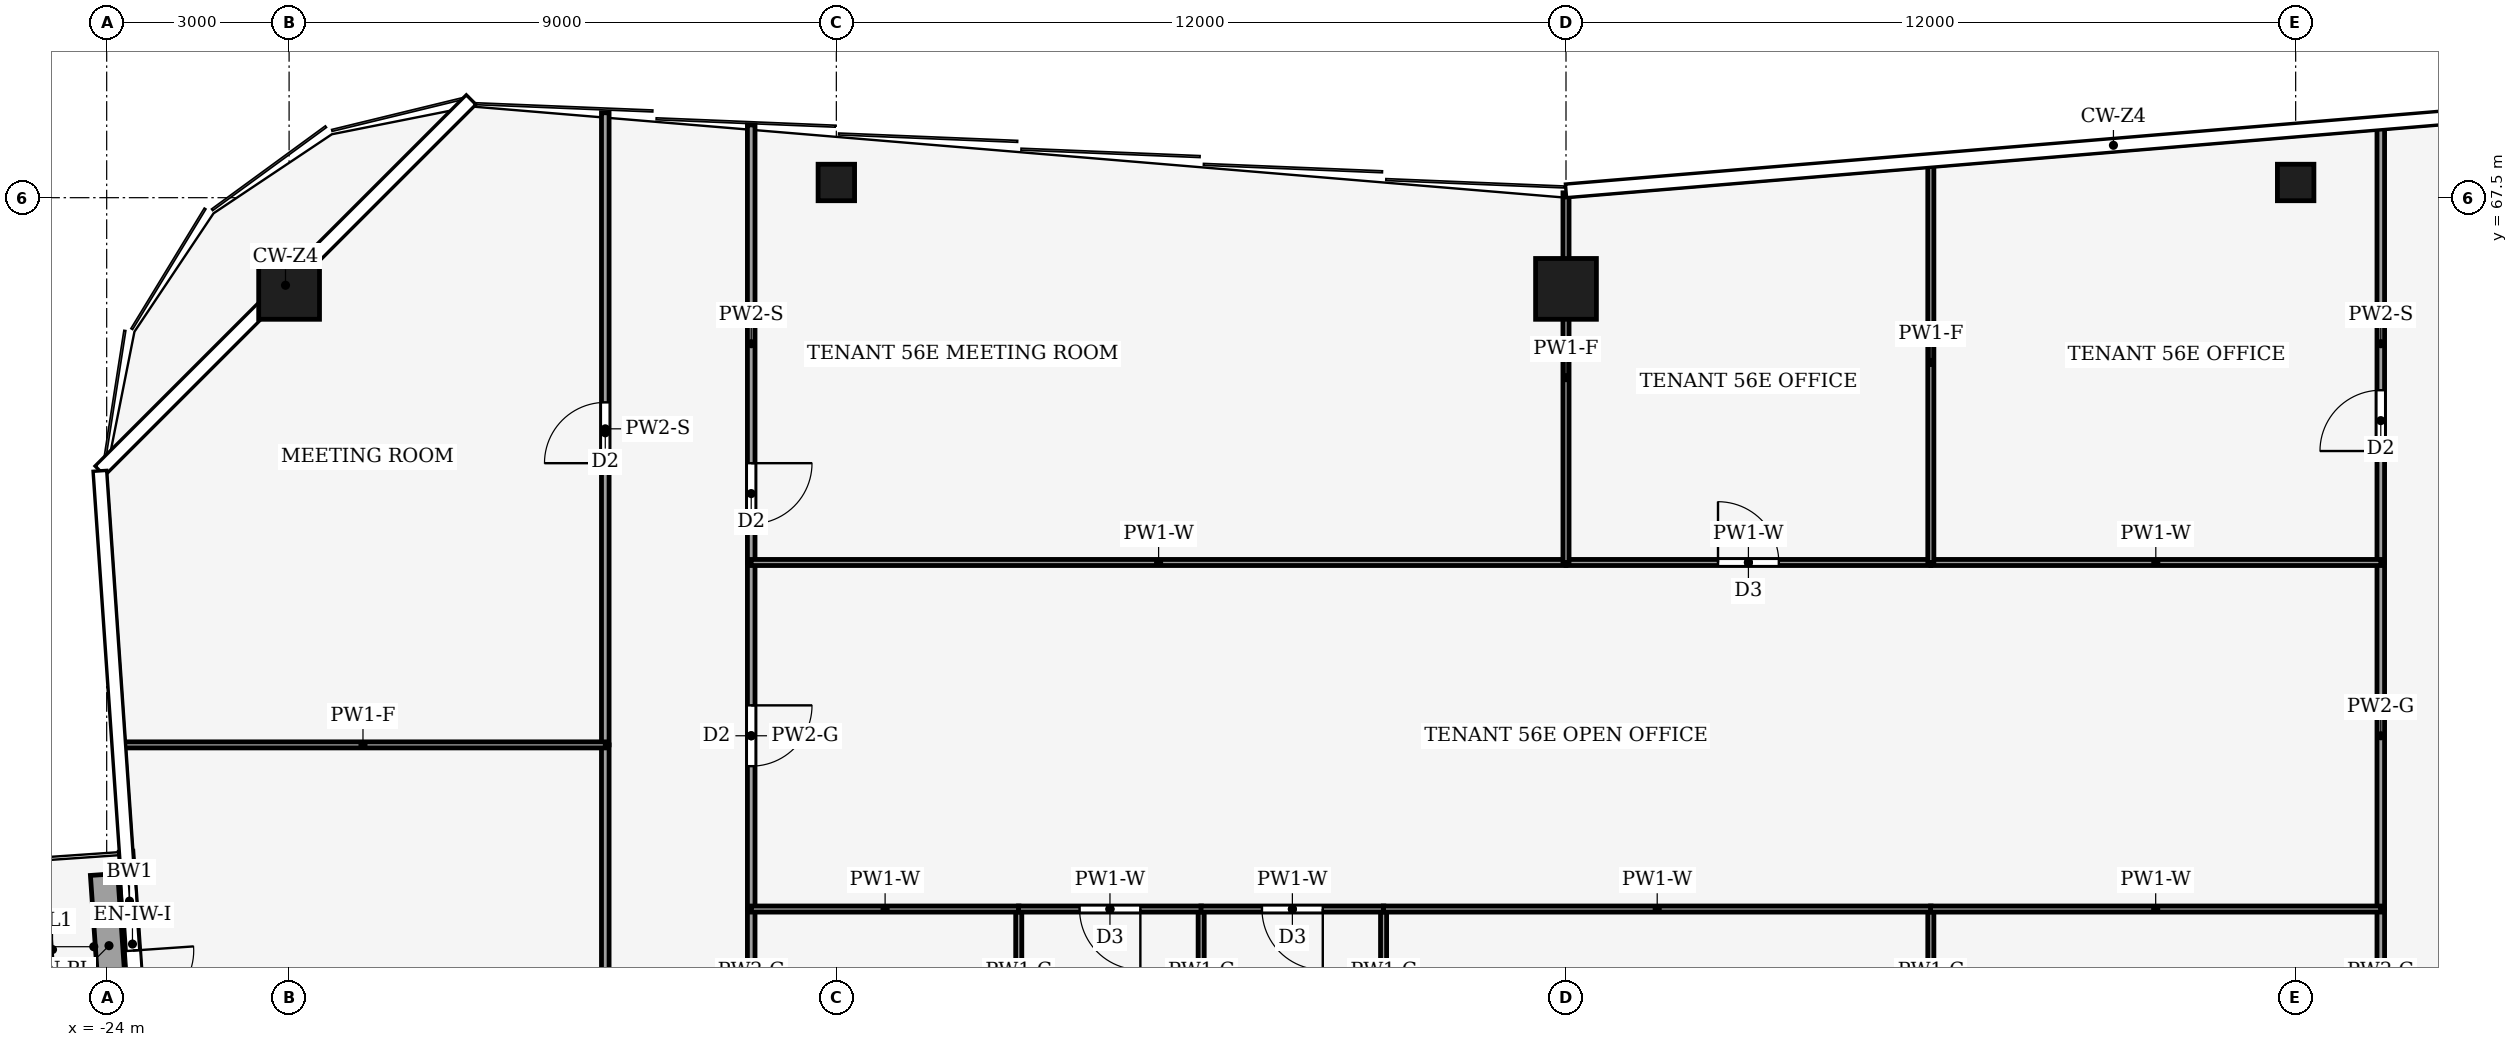
"""IFC4 building model, lengths in metres.
Left out: names, types, materials, properties, quantities, classifications, styles, units other than length and angle.
Written with IfcOpenShell. Run it as: python <this file> out.ifc"""

import sys

from ifc_helpers import new_model, si_unit, direction, frame, frame_2d, origin, origin_2d, place, context, subcontext, project, spatial, rectangle, hollow_rectangle, extrude, element, fill, save


model = new_model("IFC4")
c1 = context("Model", 3, precision=1e-05, world=origin(), true_north=direction((0.0, 1.0)))
c2 = subcontext(c1, "Body", "Model", "MODEL_VIEW")
j1 = project(units=[si_unit("LENGTHUNIT", "METRE"), si_unit("PLANEANGLEUNIT", "RADIAN")], contexts=[c1])
p1 = place(None, origin())
s1 = spatial("IfcSite", under=j1, at=p1, CompositionType="ELEMENT")
p2 = place(p1, origin())
s2 = spatial("IfcBuilding", under=s1, at=p2, CompositionType="ELEMENT")
p3 = place(p2, frame((0.0, 0.0, 246.0)))
s3 = spatial("IfcBuildingStorey", under=s2, at=p3, CompositionType="ELEMENT", Elevation=246.0)
for number, where, z_axis, x_axis in (
    (1, (-21.0, 66.0, 0.0), (0.0, 0.0, 1.0), (1.0, 0.0, 0.0)),
    (2, (0.0, 66.0, 0.0), (0.0, 0.0, 1.0), (1.0, 0.0, 0.0)),
):
    element("IfcColumn", number, at=place(p3, frame(where, z_axis=z_axis, x_axis=x_axis)), inside=s3, PredefinedType="COLUMN", context=c2, shape_type="SweptSolid", body=[
        extrude(hollow_rectangle(XDim=1.0, YDim=1.0, WallThickness=0.045, at=origin_2d()), origin(), (0.0, 0.0, 1.0), 4.0),
    ])
for number, where, z_axis, x_axis in (
    (3, (-12.0, 67.75, 0.0), (0.0, 0.0, 1.0), (1.0, 0.0, 0.0)),
    (4, (12.0, 67.75, 0.0), (0.0, 0.0, 1.0), (1.0, 0.0, 0.0)),
):
    element("IfcColumn", number, at=place(p3, frame(where, z_axis=z_axis, x_axis=x_axis)), inside=s3, PredefinedType="COLUMN", context=c2, shape_type="SweptSolid", body=[
        extrude(hollow_rectangle(XDim=0.6, YDim=0.6, WallThickness=0.025, at=origin_2d()), origin(), (0.0, 0.0, 1.0), 4.0),
    ])
p4 = place(p3, frame((-23.681, 56.744, 0.0), z_axis=(0.0, 0.0, 1.0), x_axis=(0.068837845086, -0.997627862023, 0.0)))
e5 = element("IfcWall", 5, at=p4, inside=s3, PredefinedType="SOLIDWALL", context=c2, shape_type="SweptSolid", body=[
    extrude(rectangle(XDim=3.047, YDim=0.224, at=frame_2d((1.523, 0.0))), origin(), (0.0, 0.0, 1.0), 3.65),
])
p5 = place(p4, frame((1.631, 0.0, 0.0)))
e6 = element("IfcOpeningElement", 6, at=p5, cuts=e5, PredefinedType="OPENING", context=c2, shape_type="SweptSolid", body=[
    extrude(rectangle(XDim=1.0, YDim=2.1, at=frame_2d((0.5, 1.05))), frame((0.0, 0.122, 0.0), z_axis=(0.0, -1.0, 0.0), x_axis=(1.0, 0.0, 0.0)), (0.0, 0.0, 1.0), 0.244),
])
p6 = place(p4, frame((0.416, 0.0, 0.9)))
e7 = element("IfcOpeningElement", 7, at=p6, cuts=e5, PredefinedType="OPENING", context=c2, shape_type="SweptSolid", body=[
    extrude(rectangle(XDim=0.8, YDim=1.2, at=frame_2d((0.4, 0.6))), frame((0.0, 0.122, 0.0), z_axis=(0.0, -1.0, 0.0), x_axis=(1.0, 0.0, 0.0)), (0.0, 0.0, 1.0), 0.244),
])
p7 = place(p3, frame((-24.043, 56.368, 0.0), z_axis=(0.0, 0.0, 1.0), x_axis=(0.068769956374, -0.997632544127, 0.0)))
e8 = element("IfcWall", 8, at=p7, inside=s3, PredefinedType="USERDEFINED", context=c2, shape_type="SweptSolid", body=[
    extrude(rectangle(XDim=2.347, YDim=0.45, at=frame_2d((1.173, 0.0))), origin(), (0.0, 0.0, 1.0), 0.4),
])
p8 = place(p3, frame((-15.8, 46.5, 0.0), z_axis=(0.0, 0.0, 1.0), x_axis=(0.0, 1.0, 0.0)))
e9 = element("IfcWall", 9, at=p8, inside=s3, PredefinedType="PARTITIONING", context=c2, shape_type="SweptSolid", body=[
    extrude(rectangle(XDim=12.0, YDim=0.125, at=frame_2d((6.0, 0.0))), origin(), (0.0, 0.0, 1.0), 3.24),
])
p9 = place(p8, frame((5.5, 0.0, 0.0)))
e10 = element("IfcOpeningElement", 10, at=p9, cuts=e9, PredefinedType="OPENING", context=c2, shape_type="SweptSolid", body=[
    extrude(rectangle(XDim=1.0, YDim=2.1, at=frame_2d((0.5, 1.05))), frame((0.0, 0.073, 0.0), z_axis=(0.0, -1.0, 0.0), x_axis=(1.0, 0.0, 0.0)), (0.0, 0.0, 1.0), 0.145),
])
p10 = place(p3, frame((-15.8, 58.5, 0.0), z_axis=(0.0, 0.0, 1.0), x_axis=(0.0, 1.0, 0.0)))
e11 = element("IfcWall", 11, at=p10, inside=s3, PredefinedType="PARTITIONING", context=c2, shape_type="SweptSolid", body=[
    extrude(rectangle(XDim=10.397, YDim=0.125, at=frame_2d((5.198, 0.0))), origin(), (0.0, 0.0, 1.0), 3.04),
])
p11 = place(p10, frame((4.633, 0.0, 0.0)))
e12 = element("IfcOpeningElement", 12, at=p11, cuts=e11, PredefinedType="OPENING", context=c2, shape_type="SweptSolid", body=[
    extrude(rectangle(XDim=1.0, YDim=2.1, at=frame_2d((0.5, 1.05))), frame((0.0, 0.073, 0.0), z_axis=(0.0, -1.0, 0.0), x_axis=(1.0, 0.0, 0.0)), (0.0, 0.0, 1.0), 0.145),
])
for number, where, z_axis, x_axis in (
    (13, (-13.4, 52.8, 0.0), (0.0, 0.0, 1.0), (0.0, 1.0, 0.0)),
    (14, (13.4, 52.8, 0.0), (0.0, 0.0, 1.0), (0.0, 1.0, 0.0)),
):
    element("IfcWall", number, at=place(p3, frame(where, z_axis=z_axis, x_axis=x_axis)), inside=s3, PredefinedType="PARTITIONING", context=c2, shape_type="SweptSolid", body=[
        extrude(rectangle(XDim=3.0, YDim=0.125, at=frame_2d((1.5, 0.0))), origin(), (0.0, 0.0, 1.0), 3.87),
    ])
p12 = place(p3, frame((-13.4, 61.5, 0.0), z_axis=(0.0, 0.0, 1.0), x_axis=(0.0, -1.0, 0.0)))
e15 = element("IfcWall", 15, at=p12, inside=s3, PredefinedType="PARTITIONING", context=c2, shape_type="SweptSolid", body=[
    extrude(rectangle(XDim=5.7, YDim=0.125, at=frame_2d((2.85, 0.0))), origin(), (0.0, 0.0, 1.0), 3.87),
])
p13 = place(p12, frame((2.35, 0.0, 0.0)))
e16 = element("IfcOpeningElement", 16, at=p13, cuts=e15, PredefinedType="OPENING", context=c2, shape_type="SweptSolid", body=[
    extrude(rectangle(XDim=1.0, YDim=2.1, at=frame_2d((0.5, 1.05))), frame((0.0, 0.073, 0.0), z_axis=(0.0, -1.0, 0.0), x_axis=(1.0, 0.0, 0.0)), (0.0, 0.0, 1.0), 0.145),
])
p14 = place(p3, frame((13.4, 55.8, 0.0), z_axis=(0.0, 0.0, 1.0), x_axis=(0.0, 1.0, 0.0)))
e17 = element("IfcWall", 17, at=p14, inside=s3, PredefinedType="PARTITIONING", context=c2, shape_type="SweptSolid", body=[
    extrude(rectangle(XDim=5.7, YDim=0.125, at=frame_2d((2.85, 0.0))), origin(), (0.0, 0.0, 1.0), 3.87),
])
p15 = place(p3, frame((-13.4, 68.697, 0.0), z_axis=(0.0, 0.0, 1.0), x_axis=(0.0, -1.0, 0.0)))
e18 = element("IfcWall", 18, at=p15, inside=s3, PredefinedType="PARTITIONING", context=c2, shape_type="SweptSolid", body=[
    extrude(rectangle(XDim=7.197, YDim=0.125, at=frame_2d((3.598, 0.0))), origin(), (0.0, 0.0, 1.0), 3.04),
])
p16 = place(p15, frame((5.563, 0.0, 0.0)))
e19 = element("IfcOpeningElement", 19, at=p16, cuts=e18, PredefinedType="OPENING", context=c2, shape_type="SweptSolid", body=[
    extrude(rectangle(XDim=1.0, YDim=2.1, at=frame_2d((0.5, 1.05))), frame((0.0, 0.073, 0.0), z_axis=(0.0, -1.0, 0.0), x_axis=(1.0, 0.0, 0.0)), (0.0, 0.0, 1.0), 0.145),
])
p17 = place(p3, frame((13.4, 61.5, 0.0), z_axis=(0.0, 0.0, 1.0), x_axis=(0.0, 1.0, 0.0)))
e20 = element("IfcWall", 20, at=p17, inside=s3, PredefinedType="PARTITIONING", context=c2, shape_type="SweptSolid", body=[
    extrude(rectangle(XDim=7.197, YDim=0.125, at=frame_2d((3.598, 0.0))), origin(), (0.0, 0.0, 1.0), 3.04),
])
p18 = place(p17, frame((1.833, 0.0, 0.0)))
e21 = element("IfcOpeningElement", 21, at=p18, cuts=e20, PredefinedType="OPENING", context=c2, shape_type="SweptSolid", body=[
    extrude(rectangle(XDim=1.0, YDim=2.1, at=frame_2d((0.5, 1.05))), frame((0.0, 0.073, 0.0), z_axis=(0.0, -1.0, 0.0), x_axis=(1.0, 0.0, 0.0)), (0.0, 0.0, 1.0), 0.145),
])
p19 = place(p3, frame((-15.8, 58.5, 0.0), z_axis=(0.0, 0.0, 1.0), x_axis=(-1.0, 0.0, 0.0)))
e22 = element("IfcWall", 22, at=p19, inside=s3, PredefinedType="PARTITIONING", context=c2, shape_type="SweptSolid", body=[
    extrude(rectangle(XDim=7.97, YDim=0.1, at=frame_2d((3.985, 0.0))), origin(), (0.0, 0.0, 1.0), 3.04),
])
p20 = place(p3, frame((-9.0, 52.8, 0.0), z_axis=(0.0, 0.0, 1.0), x_axis=(0.0, 1.0, 0.0)))
e23 = element("IfcWall", 23, at=p20, inside=s3, PredefinedType="PARTITIONING", context=c2, shape_type="SweptSolid", body=[
    extrude(rectangle(XDim=3.0, YDim=0.1, at=frame_2d((1.5, 0.0))), origin(), (0.0, 0.0, 1.0), 3.87),
])
p21 = place(p3, frame((-8.996, 55.8, 0.0), z_axis=(0.0, 0.0, 1.0), x_axis=(-1.0, 0.0, 0.0)))
e24 = element("IfcWall", 24, at=p21, inside=s3, PredefinedType="PARTITIONING", context=c2, shape_type="SweptSolid", body=[
    extrude(rectangle(XDim=4.404, YDim=0.1, at=frame_2d((2.202, 0.0))), origin(), (0.0, 0.0, 1.0), 3.24),
])
p22 = place(p3, frame((-6.0, 52.8, 0.0), z_axis=(0.0, 0.0, 1.0), x_axis=(0.0, 1.0, 0.0)))
e25 = element("IfcWall", 25, at=p22, inside=s3, PredefinedType="PARTITIONING", context=c2, shape_type="SweptSolid", body=[
    extrude(rectangle(XDim=3.0, YDim=0.1, at=frame_2d((1.5, 0.0))), origin(), (0.0, 0.0, 1.0), 3.87),
])
p23 = place(p3, frame((-5.996, 55.8, 0.0), z_axis=(0.0, 0.0, 1.0), x_axis=(-1.0, 0.0, 0.0)))
e26 = element("IfcWall", 26, at=p23, inside=s3, PredefinedType="PARTITIONING", context=c2, shape_type="SweptSolid", body=[
    extrude(rectangle(XDim=3.008, YDim=0.1, at=frame_2d((1.504, 0.0))), origin(), (0.0, 0.0, 1.0), 3.24),
])
p24 = place(p23, frame((1.004, 0.0, 0.0)))
e27 = element("IfcOpeningElement", 27, at=p24, cuts=e26, PredefinedType="OPENING", context=c2, shape_type="SweptSolid", body=[
    extrude(rectangle(XDim=1.0, YDim=2.1, at=frame_2d((0.5, 1.05))), frame((0.0, 0.06, 0.0), z_axis=(0.0, -1.0, 0.0), x_axis=(1.0, 0.0, 0.0)), (0.0, 0.0, 1.0), 0.12),
])
p25 = place(p3, frame((-3.0, 52.8, 0.0), z_axis=(0.0, 0.0, 1.0), x_axis=(0.0, 1.0, 0.0)))
e28 = element("IfcWall", 28, at=p25, inside=s3, PredefinedType="PARTITIONING", context=c2, shape_type="SweptSolid", body=[
    extrude(rectangle(XDim=3.0, YDim=0.1, at=frame_2d((1.5, 0.0))), origin(), (0.0, 0.0, 1.0), 3.87),
])
p26 = place(p3, frame((-2.996, 55.8, 0.0), z_axis=(0.0, 0.0, 1.0), x_axis=(-1.0, 0.0, 0.0)))
e29 = element("IfcWall", 29, at=p26, inside=s3, PredefinedType="PARTITIONING", context=c2, shape_type="SweptSolid", body=[
    extrude(rectangle(XDim=3.008, YDim=0.1, at=frame_2d((1.504, 0.0))), origin(), (0.0, 0.0, 1.0), 3.24),
])
p27 = place(p26, frame((1.004, 0.0, 0.0)))
e30 = element("IfcOpeningElement", 30, at=p27, cuts=e29, PredefinedType="OPENING", context=c2, shape_type="SweptSolid", body=[
    extrude(rectangle(XDim=1.0, YDim=2.1, at=frame_2d((0.5, 1.05))), frame((0.0, 0.06, 0.0), z_axis=(0.0, -1.0, 0.0), x_axis=(1.0, 0.0, 0.0)), (0.0, 0.0, 1.0), 0.12),
])
p28 = place(p3, frame((6.0, 52.8, 0.0), z_axis=(0.0, 0.0, 1.0), x_axis=(0.0, 1.0, 0.0)))
e31 = element("IfcWall", 31, at=p28, inside=s3, PredefinedType="PARTITIONING", context=c2, shape_type="SweptSolid", body=[
    extrude(rectangle(XDim=3.0, YDim=0.1, at=frame_2d((1.5, 0.0))), origin(), (0.0, 0.0, 1.0), 3.87),
])
p29 = place(p3, frame((6.004, 55.8, 0.0), z_axis=(0.0, 0.0, 1.0), x_axis=(-1.0, 0.0, 0.0)))
e32 = element("IfcWall", 32, at=p29, inside=s3, PredefinedType="PARTITIONING", context=c2, shape_type="SweptSolid", body=[
    extrude(rectangle(XDim=9.008, YDim=0.1, at=frame_2d((4.504, 0.0))), origin(), (0.0, 0.0, 1.0), 3.24),
])
p30 = place(p3, frame((13.4, 55.8, 0.0), z_axis=(0.0, 0.0, 1.0), x_axis=(-1.0, 0.0, 0.0)))
e33 = element("IfcWall", 33, at=p30, inside=s3, PredefinedType="PARTITIONING", context=c2, shape_type="SweptSolid", body=[
    extrude(rectangle(XDim=7.404, YDim=0.1, at=frame_2d((3.702, 0.0))), origin(), (0.0, 0.0, 1.0), 3.24),
])
p31 = place(p3, frame((0.0, 61.5, 0.0), z_axis=(0.0, 0.0, 1.0), x_axis=(-1.0, 0.0, 0.0)))
e34 = element("IfcWall", 34, at=p31, inside=s3, PredefinedType="PARTITIONING", context=c2, shape_type="SweptSolid", body=[
    extrude(rectangle(XDim=13.4, YDim=0.1, at=frame_2d((6.7, 0.0))), origin(), (0.0, 0.0, 1.0), 3.24),
])
p32 = place(p3, frame((0.0, 61.5, 0.0), z_axis=(0.0, 0.0, 1.0), x_axis=(1.0, 0.0, 0.0)))
e35 = element("IfcWall", 35, at=p32, inside=s3, PredefinedType="PARTITIONING", context=c2, shape_type="SweptSolid", body=[
    extrude(rectangle(XDim=6.0, YDim=0.1, at=frame_2d((3.0, 0.0))), origin(), (0.0, 0.0, 1.0), 3.24),
])
p33 = place(p32, frame((2.5, 0.0, 0.0)))
e36 = element("IfcOpeningElement", 36, at=p33, cuts=e35, PredefinedType="OPENING", context=c2, shape_type="SweptSolid", body=[
    extrude(rectangle(XDim=1.0, YDim=2.1, at=frame_2d((0.5, 1.05))), frame((0.0, 0.06, 0.0), z_axis=(0.0, -1.0, 0.0), x_axis=(1.0, 0.0, 0.0)), (0.0, 0.0, 1.0), 0.12),
])
p34 = place(p3, frame((13.4, 61.5, 0.0), z_axis=(0.0, 0.0, 1.0), x_axis=(-1.0, 0.0, 0.0)))
e37 = element("IfcWall", 37, at=p34, inside=s3, PredefinedType="PARTITIONING", context=c2, shape_type="SweptSolid", body=[
    extrude(rectangle(XDim=7.4, YDim=0.1, at=frame_2d((3.7, 0.0))), origin(), (0.0, 0.0, 1.0), 3.24),
])
p35 = place(p3, frame((0.0, 61.5, 0.0), z_axis=(0.0, 0.0, 1.0), x_axis=(0.0, 1.0, 0.0)))
e38 = element("IfcWall", 38, at=p35, inside=s3, PredefinedType="PARTITIONING", context=c2, shape_type="SweptSolid", body=[
    extrude(rectangle(XDim=6.08, YDim=0.1, at=frame_2d((3.04, 0.0))), origin(), (0.0, 0.0, 1.0), 3.04),
])
p36 = place(p3, frame((6.0, 61.5, 0.0), z_axis=(0.0, 0.0, 1.0), x_axis=(0.0, 1.0, 0.0)))
e39 = element("IfcWall", 39, at=p36, inside=s3, PredefinedType="PARTITIONING", context=c2, shape_type="SweptSolid", body=[
    extrude(rectangle(XDim=6.58, YDim=0.1, at=frame_2d((3.29, 0.0))), origin(), (0.0, 0.0, 1.0), 3.04),
])
p37 = place(p5, origin())
e40 = element("IfcDoor", 40, at=p37, inside=s3, OperationType="SINGLE_SWING_RIGHT", PredefinedType="DOOR", context=c2, shape_type="SweptSolid", body=[
    extrude(rectangle(XDim=1.0, YDim=2.1, at=frame_2d((0.5, 1.05))), frame((0.0, 0.025, 0.0), z_axis=(0.0, -1.0, 0.0), x_axis=(1.0, 0.0, 0.0)), (0.0, 0.0, 1.0), 0.05),
])
fill(e6, e40)
p38 = place(p6, origin())
e41 = element("IfcWindow", 41, at=p38, inside=s3, PartitioningType="SINGLE_PANEL", PredefinedType="WINDOW", context=c2, shape_type="SweptSolid", body=[
    extrude(rectangle(XDim=0.8, YDim=1.2, at=frame_2d((0.4, 0.6))), frame((0.0, 0.03, 0.0), z_axis=(0.0, -1.0, 0.0), x_axis=(1.0, 0.0, 0.0)), (0.0, 0.0, 1.0), 0.06),
])
fill(e7, e41)
p39 = place(p11, origin())
e42 = element("IfcDoor", 42, at=p39, inside=s3, OperationType="SINGLE_SWING_LEFT", PredefinedType="DOOR", context=c2, shape_type="SweptSolid", body=[
    extrude(rectangle(XDim=1.0, YDim=2.1, at=frame_2d((0.5, 1.05))), frame((0.0, 0.025, 0.0), z_axis=(0.0, -1.0, 0.0), x_axis=(1.0, 0.0, 0.0)), (0.0, 0.0, 1.0), 0.05),
])
fill(e12, e42)
p40 = place(p13, origin())
e43 = element("IfcDoor", 43, at=p40, inside=s3, OperationType="SINGLE_SWING_RIGHT", PredefinedType="DOOR", context=c2, shape_type="SweptSolid", body=[
    extrude(rectangle(XDim=1.0, YDim=2.1, at=frame_2d((0.5, 1.05))), frame((0.0, 0.025, 0.0), z_axis=(0.0, -1.0, 0.0), x_axis=(1.0, 0.0, 0.0)), (0.0, 0.0, 1.0), 0.05),
])
fill(e16, e43)
p41 = place(p16, origin())
e44 = element("IfcDoor", 44, at=p41, inside=s3, OperationType="SINGLE_SWING_RIGHT", PredefinedType="DOOR", context=c2, shape_type="SweptSolid", body=[
    extrude(rectangle(XDim=1.0, YDim=2.1, at=frame_2d((0.5, 1.05))), frame((0.0, 0.025, 0.0), z_axis=(0.0, -1.0, 0.0), x_axis=(1.0, 0.0, 0.0)), (0.0, 0.0, 1.0), 0.05),
])
fill(e19, e44)
p42 = place(p18, origin())
e45 = element("IfcDoor", 45, at=p42, inside=s3, OperationType="SINGLE_SWING_LEFT", PredefinedType="DOOR", context=c2, shape_type="SweptSolid", body=[
    extrude(rectangle(XDim=1.0, YDim=2.1, at=frame_2d((0.5, 1.05))), frame((0.0, 0.025, 0.0), z_axis=(0.0, -1.0, 0.0), x_axis=(1.0, 0.0, 0.0)), (0.0, 0.0, 1.0), 0.05),
])
fill(e21, e45)
p43 = place(p24, origin())
e46 = element("IfcDoor", 46, at=p43, inside=s3, OperationType="SINGLE_SWING_RIGHT", PredefinedType="DOOR", context=c2, shape_type="SweptSolid", body=[
    extrude(rectangle(XDim=1.0, YDim=2.1, at=frame_2d((0.5, 1.05))), frame((0.0, 0.025, 0.0), z_axis=(0.0, -1.0, 0.0), x_axis=(1.0, 0.0, 0.0)), (0.0, 0.0, 1.0), 0.05),
])
fill(e27, e46)
p44 = place(p27, origin())
e47 = element("IfcDoor", 47, at=p44, inside=s3, OperationType="SINGLE_SWING_LEFT", PredefinedType="DOOR", context=c2, shape_type="SweptSolid", body=[
    extrude(rectangle(XDim=1.0, YDim=2.1, at=frame_2d((0.5, 1.05))), frame((0.0, 0.025, 0.0), z_axis=(0.0, -1.0, 0.0), x_axis=(1.0, 0.0, 0.0)), (0.0, 0.0, 1.0), 0.05),
])
fill(e30, e47)
p45 = place(p33, origin())
e48 = element("IfcDoor", 48, at=p45, inside=s3, OperationType="SINGLE_SWING_RIGHT", PredefinedType="DOOR", context=c2, shape_type="SweptSolid", body=[
    extrude(rectangle(XDim=1.0, YDim=2.1, at=frame_2d((0.5, 1.05))), frame((0.0, 0.025, 0.0), z_axis=(0.0, -1.0, 0.0), x_axis=(1.0, 0.0, 0.0)), (0.0, 0.0, 1.0), 0.05),
])
fill(e36, e48)
save(model, sys.argv[1])
